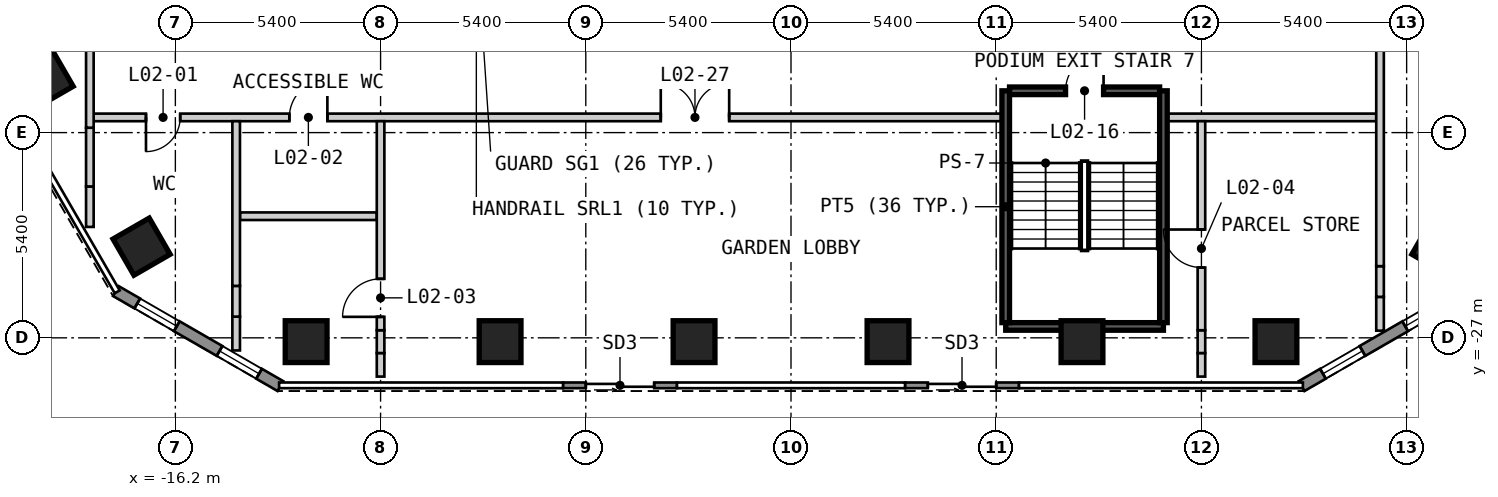
"""IFC4 building model, lengths in metres.
Left out: names, types, materials, properties, quantities, classifications, styles, units other than length and angle.
Written with IfcOpenShell. Run it as: python <this file> out.ifc"""

import sys

from ifc_helpers import new_model, si_unit, direction, frame, frame_2d, origin, origin_2d, place, context, subcontext, project, spatial, polyline, rectangle, outline, extrude, element, fill, save


model = new_model("IFC4")
c1 = context("Model", 3, precision=1e-05, world=origin(), true_north=direction((0.0, 1.0)))
c2 = subcontext(c1, "Body", "Model", "MODEL_VIEW")
j1 = project(units=[si_unit("LENGTHUNIT", "METRE"), si_unit("PLANEANGLEUNIT", "RADIAN")], contexts=[c1])
p1 = place(None, origin())
s1 = spatial("IfcSite", under=j1, at=p1, CompositionType="ELEMENT")
p2 = place(p1, origin())
s2 = spatial("IfcBuilding", under=s1, at=p2, CompositionType="ELEMENT")
p3 = place(p2, frame((0.0, 0.0, 9.0)))
s3 = spatial("IfcBuildingStorey", under=s2, at=p3, CompositionType="ELEMENT", Elevation=9.0)
for number, where, z_axis, x_axis in (
    (1, (-19.641, -20.181, 0.0), (0.0, 0.0, 1.0), (0.5, -0.866, 0.0)),
    (2, (-17.089, -24.601, 0.0), (0.0, 0.0, 1.0), (0.5, -0.866, 0.0)),
    (3, (-12.759, -27.1, 0.0), (0.0, 0.0, 1.0), (1.0, 0.0, 0.0)),
    (4, (-7.655, -27.1, 0.0), (0.0, 0.0, 1.0), (1.0, 0.0, 0.0)),
    (5, (-2.551, -27.1, 0.0), (0.0, 0.0, 1.0), (1.0, 0.0, 0.0)),
    (6, (2.553, -27.1, 0.0), (0.0, 0.0, 1.0), (1.0, 0.0, 0.0)),
    (7, (7.657, -27.1, 0.0), (0.0, 0.0, 1.0), (1.0, 0.0, 0.0)),
    (8, (12.761, -27.1, 0.0), (0.0, 0.0, 1.0), (1.0, 0.0, 0.0)),
    (9, (17.09, -24.6, 0.0), (0.0, 0.0, 1.0), (0.5, 0.866, 0.0)),
):
    element("IfcColumn", number, at=place(p3, frame(where, z_axis=z_axis, x_axis=x_axis)), inside=s3, PredefinedType="COLUMN", context=c2, shape_type="SweptSolid", body=[
        extrude(rectangle(XDim=1.1, YDim=1.1, at=origin_2d()), origin(), (0.0, 0.0, 1.0), 3.6),
    ])
p4 = place(p3, frame((-17.765, -25.77, 0.0), z_axis=(0.0, 0.0, 1.0), x_axis=(0.866010750942, -0.50002537861, 0.0)))
e10 = element("IfcWall", 10, at=p4, inside=s3, PredefinedType="SOLIDWALL", context=c2, shape_type="SweptSolid", body=[
    extrude(outline(polyline([(0.0, -0.15), (5.0, -0.15), (4.919, 0.15), (0.08, 0.15), (0.0, -0.15)])), origin(), (0.0, 0.0, 1.0), 3.25),
])
p5 = place(p4, frame((0.65, 0.0, 0.15)))
e11 = element("IfcOpeningElement", 11, at=p5, cuts=e10, PredefinedType="OPENING", context=c2, shape_type="SweptSolid", body=[
    extrude(rectangle(XDim=1.2, YDim=2.1, at=frame_2d((0.6, 1.05))), frame((0.0, 0.16, 0.0), z_axis=(0.0, -1.0, 0.0), x_axis=(1.0, 0.0, 0.0)), (0.0, 0.0, 1.0), 0.32),
])
p6 = place(p4, frame((3.15, 0.0, 0.15)))
e12 = element("IfcOpeningElement", 12, at=p6, cuts=e10, PredefinedType="OPENING", context=c2, shape_type="SweptSolid", body=[
    extrude(rectangle(XDim=1.2, YDim=2.1, at=frame_2d((0.6, 1.05))), frame((0.0, 0.16, 0.0), z_axis=(0.0, -1.0, 0.0), x_axis=(1.0, 0.0, 0.0)), (0.0, 0.0, 1.0), 0.32),
])
p7 = place(p3, frame((-6.0, -28.25, 0.0), z_axis=(0.0, 0.0, 1.0), x_axis=(1.0, 0.0, 0.0)))
e13 = element("IfcWall", 13, at=p7, inside=s3, PredefinedType="SOLIDWALL", context=c2, shape_type="SweptSolid", body=[
    extrude(rectangle(XDim=3.0, YDim=0.15, at=frame_2d((1.5, 0.0))), origin(), (0.0, 0.0, 1.0), 3.25),
])
p8 = place(p7, frame((0.6, 0.0, 0.0)))
e14 = element("IfcOpeningElement", 14, at=p8, cuts=e13, PredefinedType="OPENING", context=c2, shape_type="SweptSolid", body=[
    extrude(rectangle(XDim=1.8, YDim=2.4, at=frame_2d((0.9, 1.2))), frame((0.0, 0.085, 0.0), z_axis=(0.0, -1.0, 0.0), x_axis=(1.0, 0.0, 0.0)), (0.0, 0.0, 1.0), 0.17),
])
p9 = place(p3, frame((3.0, -28.25, 0.0), z_axis=(0.0, 0.0, 1.0), x_axis=(1.0, 0.0, 0.0)))
e15 = element("IfcWall", 15, at=p9, inside=s3, PredefinedType="SOLIDWALL", context=c2, shape_type="SweptSolid", body=[
    extrude(rectangle(XDim=3.0, YDim=0.15, at=frame_2d((1.5, 0.0))), origin(), (0.0, 0.0, 1.0), 3.25),
])
p10 = place(p9, frame((0.6, 0.0, 0.0)))
e16 = element("IfcOpeningElement", 16, at=p10, cuts=e15, PredefinedType="OPENING", context=c2, shape_type="SweptSolid", body=[
    extrude(rectangle(XDim=1.8, YDim=2.4, at=frame_2d((0.9, 1.2))), frame((0.0, 0.085, 0.0), z_axis=(0.0, -1.0, 0.0), x_axis=(1.0, 0.0, 0.0)), (0.0, 0.0, 1.0), 0.17),
])
p11 = place(p3, frame((13.435, -28.27, 0.0), z_axis=(0.0, 0.0, 1.0), x_axis=(0.866010750942, 0.50002537861, 0.0)))
e17 = element("IfcWall", 17, at=p11, inside=s3, PredefinedType="SOLIDWALL", context=c2, shape_type="SweptSolid", body=[
    extrude(outline(polyline([(0.0, -0.15), (5.0, -0.15), (4.919, 0.15), (0.08, 0.15), (0.0, -0.15)])), origin(), (0.0, 0.0, 1.0), 3.25),
])
p12 = place(p11, frame((0.65, 0.0, 0.15)))
e18 = element("IfcOpeningElement", 18, at=p12, cuts=e17, PredefinedType="OPENING", context=c2, shape_type="SweptSolid", body=[
    extrude(rectangle(XDim=1.2, YDim=2.1, at=frame_2d((0.6, 1.05))), frame((0.0, 0.16, 0.0), z_axis=(0.0, -1.0, 0.0), x_axis=(1.0, 0.0, 0.0)), (0.0, 0.0, 1.0), 0.32),
])
p13 = place(p11, frame((3.149, 0.0, 0.15)))
e19 = element("IfcOpeningElement", 19, at=p13, cuts=e17, PredefinedType="OPENING", context=c2, shape_type="SweptSolid", body=[
    extrude(rectangle(XDim=1.2, YDim=2.1, at=frame_2d((0.6, 1.05))), frame((0.0, 0.16, 0.0), z_axis=(0.0, -1.0, 0.0), x_axis=(1.0, 0.0, 0.0)), (0.0, 0.0, 1.0), 0.32),
])
p14 = place(p3, frame((5.65, -26.7, 0.0), z_axis=(0.0, 0.0, 1.0), x_axis=(1.0, 0.0, 0.0)))
e20 = element("IfcWall", 20, at=p14, inside=s3, PredefinedType="SOLIDWALL", context=c2, shape_type="SweptSolid", body=[
    extrude(rectangle(XDim=4.15, YDim=0.2, at=frame_2d((2.075, 0.0))), origin(), (0.0, 0.0, 1.0), 3.25),
])
p15 = place(p3, frame((-14.5, -23.8, 0.0), z_axis=(0.0, 0.0, 1.0), x_axis=(1.0, 0.0, 0.0)))
e21 = element("IfcWall", 21, at=p15, inside=s3, PredefinedType="PARTITIONING", context=c2, shape_type="SweptSolid", body=[
    extrude(rectangle(XDim=3.6, YDim=0.2, at=frame_2d((1.8, 0.0))), origin(), (0.0, 0.0, 1.0), 3.25),
])
p16 = place(p3, frame((-18.35, -21.2, 0.0), z_axis=(0.0, 0.0, 1.0), x_axis=(1.0, 0.0, 0.0)))
e22 = element("IfcWall", 22, at=p16, inside=s3, PredefinedType="PARTITIONING", context=c2, shape_type="SweptSolid", body=[
    extrude(rectangle(XDim=24.1, YDim=0.2, at=frame_2d((12.05, 0.0))), origin(), (0.0, 0.0, 1.0), 3.25),
])
p17 = place(p16, frame((2.277, 0.0, 0.0), z_axis=(0.0, 0.0, 1.0), x_axis=(-1.0, 0.0, 0.0)))
e23 = element("IfcOpeningElement", 23, at=p17, cuts=e22, PredefinedType="OPENING", context=c2, shape_type="SweptSolid", body=[
    extrude(rectangle(XDim=0.9, YDim=2.1, at=frame_2d((0.45, 1.05))), frame((0.0, 0.11, 0.0), z_axis=(0.0, -1.0, 0.0), x_axis=(1.0, 0.0, 0.0)), (0.0, 0.0, 1.0), 0.22),
])
p18 = place(p16, frame((6.15, 0.0, 0.0), z_axis=(0.0, 0.0, 1.0), x_axis=(-1.0, 0.0, 0.0)))
e24 = element("IfcOpeningElement", 24, at=p18, cuts=e22, PredefinedType="OPENING", context=c2, shape_type="SweptSolid", body=[
    extrude(rectangle(XDim=1.0, YDim=2.1, at=frame_2d((0.5, 1.05))), frame((0.0, 0.11, 0.0), z_axis=(0.0, -1.0, 0.0), x_axis=(1.0, 0.0, 0.0)), (0.0, 0.0, 1.0), 0.22),
])
p19 = place(p16, frame((14.923, 0.0, 0.0)))
e25 = element("IfcOpeningElement", 25, at=p19, cuts=e22, PredefinedType="OPENING", context=c2, shape_type="SweptSolid", body=[
    extrude(rectangle(XDim=1.8, YDim=2.1, at=frame_2d((0.9, 1.05))), frame((0.0, 0.11, 0.0), z_axis=(0.0, -1.0, 0.0), x_axis=(1.0, 0.0, 0.0)), (0.0, 0.0, 1.0), 0.22),
])
p20 = place(p3, frame((9.7, -21.2, 0.0), z_axis=(0.0, 0.0, 1.0), x_axis=(1.0, 0.0, 0.0)))
e26 = element("IfcWall", 26, at=p20, inside=s3, PredefinedType="PARTITIONING", context=c2, shape_type="SweptSolid", body=[
    extrude(rectangle(XDim=5.7, YDim=0.2, at=frame_2d((2.85, 0.0))), origin(), (0.0, 0.0, 1.0), 3.25),
])
p21 = place(p3, frame((5.75, -20.5, 0.0), z_axis=(0.0, 0.0, 1.0), x_axis=(1.0, 0.0, 0.0)))
e27 = element("IfcWall", 27, at=p21, inside=s3, PredefinedType="SOLIDWALL", context=c2, shape_type="SweptSolid", body=[
    extrude(rectangle(XDim=3.95, YDim=0.2, at=frame_2d((1.975, 0.0))), origin(), (0.0, 0.0, 1.0), 3.25),
])
p22 = place(p21, frame((2.475, 0.0, 0.0), z_axis=(0.0, 0.0, 1.0), x_axis=(-1.0, 0.0, 0.0)))
e28 = element("IfcOpeningElement", 28, at=p22, cuts=e27, PredefinedType="OPENING", context=c2, shape_type="SweptSolid", body=[
    extrude(rectangle(XDim=1.0, YDim=2.1, at=frame_2d((0.5, 1.05))), frame((0.0, 0.11, 0.0), z_axis=(0.0, -1.0, 0.0), x_axis=(1.0, 0.0, 0.0)), (0.0, 0.0, 1.0), 0.22),
])
p23 = place(p3, frame((-18.45, -24.082, 0.0), z_axis=(0.0, 0.0, 1.0), x_axis=(0.0, 1.0, 0.0)))
e29 = element("IfcWall", 29, at=p23, inside=s3, PredefinedType="PARTITIONING", context=c2, shape_type="SweptSolid", body=[
    extrude(rectangle(XDim=1.065, YDim=0.2, at=frame_2d((0.532, 0.0))), origin(), (0.0, 0.0, 1.0), 3.25),
])
p24 = place(p3, frame((-18.45, -23.017, 0.0), z_axis=(0.0, 0.0, 1.0), x_axis=(0.0, 1.0, 0.0)))
e30 = element("IfcWall", 30, at=p24, inside=s3, PredefinedType="PARTITIONING", context=c2, shape_type="SweptSolid", body=[
    extrude(rectangle(XDim=1.546, YDim=0.2, at=frame_2d((0.773, 0.0))), origin(), (0.0, 0.0, 1.0), 2.52),
])
p25 = place(p3, frame((-18.45, -21.471, 0.0), z_axis=(0.0, 0.0, 1.0), x_axis=(0.0, 1.0, 0.0)))
e31 = element("IfcWall", 31, at=p25, inside=s3, PredefinedType="PARTITIONING", context=c2, shape_type="SweptSolid", body=[
    extrude(rectangle(XDim=23.371, YDim=0.2, at=frame_2d((11.686, 0.0))), origin(), (0.0, 0.0, 1.0), 3.25),
])
p26 = place(p25, frame((5.873, 0.0, 0.0)))
e32 = element("IfcOpeningElement", 32, at=p26, cuts=e31, PredefinedType="OPENING", context=c2, shape_type="SweptSolid", body=[
    extrude(rectangle(XDim=1.0, YDim=2.1, at=frame_2d((0.5, 1.05))), frame((0.0, 0.11, 0.0), z_axis=(0.0, -1.0, 0.0), x_axis=(1.0, 0.0, 0.0)), (0.0, 0.0, 1.0), 0.22),
])
p27 = place(p25, frame((17.469, 0.0, 0.0)))
e33 = element("IfcOpeningElement", 33, at=p27, cuts=e31, PredefinedType="OPENING", context=c2, shape_type="SweptSolid", body=[
    extrude(rectangle(XDim=1.0, YDim=2.1, at=frame_2d((0.5, 1.05))), frame((0.0, 0.11, 0.0), z_axis=(0.0, -1.0, 0.0), x_axis=(1.0, 0.0, 0.0)), (0.0, 0.0, 1.0), 0.22),
])
p28 = place(p3, frame((-14.6, -27.332, 0.0), z_axis=(0.0, 0.0, 1.0), x_axis=(0.0, 1.0, 0.0)))
e34 = element("IfcWall", 34, at=p28, inside=s3, PredefinedType="PARTITIONING", context=c2, shape_type="SweptSolid", body=[
    extrude(rectangle(XDim=0.89, YDim=0.2, at=frame_2d((0.445, 0.0))), origin(), (0.0, 0.0, 1.0), 3.25),
])
p29 = place(p3, frame((-14.6, -26.442, 0.0), z_axis=(0.0, 0.0, 1.0), x_axis=(0.0, 1.0, 0.0)))
e35 = element("IfcWall", 35, at=p29, inside=s3, PredefinedType="PARTITIONING", context=c2, shape_type="SweptSolid", body=[
    extrude(rectangle(XDim=0.809, YDim=0.2, at=frame_2d((0.404, 0.0))), origin(), (0.0, 0.0, 1.0), 2.52),
])
p30 = place(p3, frame((-14.6, -25.633, 0.0), z_axis=(0.0, 0.0, 1.0), x_axis=(0.0, 1.0, 0.0)))
e36 = element("IfcWall", 36, at=p30, inside=s3, PredefinedType="PARTITIONING", context=c2, shape_type="SweptSolid", body=[
    extrude(rectangle(XDim=4.333, YDim=0.2, at=frame_2d((2.167, 0.0))), origin(), (0.0, 0.0, 1.0), 3.25),
])
p31 = place(p3, frame((-10.8, -28.02, 0.0), z_axis=(0.0, 0.0, 1.0), x_axis=(0.0, 1.0, 0.0)))
e37 = element("IfcWall", 37, at=p31, inside=s3, PredefinedType="PARTITIONING", context=c2, shape_type="SweptSolid", body=[
    extrude(rectangle(XDim=0.62, YDim=0.2, at=frame_2d((0.31, 0.0))), origin(), (0.0, 0.0, 1.0), 3.25),
])
p32 = place(p3, frame((-10.8, -27.4, 0.0), z_axis=(0.0, 0.0, 1.0), x_axis=(0.0, 1.0, 0.0)))
e38 = element("IfcWall", 38, at=p32, inside=s3, PredefinedType="PARTITIONING", context=c2, shape_type="SweptSolid", body=[
    extrude(rectangle(XDim=0.6, YDim=0.2, at=frame_2d((0.3, 0.0))), origin(), (0.0, 0.0, 1.0), 2.52),
])
p33 = place(p3, frame((-10.8, -26.8, 0.0), z_axis=(0.0, 0.0, 1.0), x_axis=(0.0, 1.0, 0.0)))
e39 = element("IfcWall", 39, at=p33, inside=s3, PredefinedType="PARTITIONING", context=c2, shape_type="SweptSolid", body=[
    extrude(rectangle(XDim=5.5, YDim=0.2, at=frame_2d((2.75, 0.0))), origin(), (0.0, 0.0, 1.0), 3.25),
])
p34 = place(p33, frame((0.352, 0.0, 0.0)))
e40 = element("IfcOpeningElement", 40, at=p34, cuts=e39, PredefinedType="OPENING", context=c2, shape_type="SweptSolid", body=[
    extrude(rectangle(XDim=1.0, YDim=2.1, at=frame_2d((0.5, 1.05))), frame((0.0, 0.11, 0.0), z_axis=(0.0, -1.0, 0.0), x_axis=(1.0, 0.0, 0.0)), (0.0, 0.0, 1.0), 0.22),
])
for number, where, z_axis, x_axis in (
    (41, (5.65, -26.6, 0.0), (0.0, 0.0, 1.0), (0.0, 1.0, 0.0)),
    (42, (9.8, -26.6, 0.0), (0.0, 0.0, 1.0), (0.0, 1.0, 0.0)),
):
    element("IfcWall", number, at=place(p3, frame(where, z_axis=z_axis, x_axis=x_axis)), inside=s3, PredefinedType="SOLIDWALL", context=c2, shape_type="SweptSolid", body=[
        extrude(rectangle(XDim=6.1, YDim=0.2, at=frame_2d((3.05, 0.0))), origin(), (0.0, 0.0, 1.0), 3.25),
    ])
p35 = place(p3, frame((10.8, -28.02, 0.0), z_axis=(0.0, 0.0, 1.0), x_axis=(0.0, 1.0, 0.0)))
e43 = element("IfcWall", 43, at=p35, inside=s3, PredefinedType="PARTITIONING", context=c2, shape_type="SweptSolid", body=[
    extrude(rectangle(XDim=0.62, YDim=0.2, at=frame_2d((0.31, 0.0))), origin(), (0.0, 0.0, 1.0), 3.25),
])
p36 = place(p3, frame((10.8, -27.4, 0.0), z_axis=(0.0, 0.0, 1.0), x_axis=(0.0, 1.0, 0.0)))
e44 = element("IfcWall", 44, at=p36, inside=s3, PredefinedType="PARTITIONING", context=c2, shape_type="SweptSolid", body=[
    extrude(rectangle(XDim=0.6, YDim=0.2, at=frame_2d((0.3, 0.0))), origin(), (0.0, 0.0, 1.0), 2.52),
])
p37 = place(p3, frame((10.8, -26.8, 0.0), z_axis=(0.0, 0.0, 1.0), x_axis=(0.0, 1.0, 0.0)))
e45 = element("IfcWall", 45, at=p37, inside=s3, PredefinedType="PARTITIONING", context=c2, shape_type="SweptSolid", body=[
    extrude(rectangle(XDim=5.5, YDim=0.2, at=frame_2d((2.75, 0.0))), origin(), (0.0, 0.0, 1.0), 3.25),
])
p38 = place(p37, frame((2.65, 0.0, 0.0), z_axis=(0.0, 0.0, 1.0), x_axis=(-1.0, 0.0, 0.0)))
e46 = element("IfcOpeningElement", 46, at=p38, cuts=e45, PredefinedType="OPENING", context=c2, shape_type="SweptSolid", body=[
    extrude(rectangle(XDim=1.0, YDim=2.1, at=frame_2d((0.5, 1.05))), frame((0.0, 0.11, 0.0), z_axis=(0.0, -1.0, 0.0), x_axis=(1.0, 0.0, 0.0)), (0.0, 0.0, 1.0), 0.22),
])
p39 = place(p3, frame((15.5, -26.812, 0.0), z_axis=(0.0, 0.0, 1.0), x_axis=(0.0, 1.0, 0.0)))
e47 = element("IfcWall", 47, at=p39, inside=s3, PredefinedType="PARTITIONING", context=c2, shape_type="SweptSolid", body=[
    extrude(rectangle(XDim=0.89, YDim=0.2, at=frame_2d((0.445, 0.0))), origin(), (0.0, 0.0, 1.0), 3.25),
])
p40 = place(p3, frame((15.5, -25.922, 0.0), z_axis=(0.0, 0.0, 1.0), x_axis=(0.0, 1.0, 0.0)))
e48 = element("IfcWall", 48, at=p40, inside=s3, PredefinedType="PARTITIONING", context=c2, shape_type="SweptSolid", body=[
    extrude(rectangle(XDim=0.808, YDim=0.2, at=frame_2d((0.404, 0.0))), origin(), (0.0, 0.0, 1.0), 2.52),
])
p41 = place(p3, frame((15.5, -25.114, 0.0), z_axis=(0.0, 0.0, 1.0), x_axis=(0.0, 1.0, 0.0)))
e49 = element("IfcWall", 49, at=p41, inside=s3, PredefinedType="PARTITIONING", context=c2, shape_type="SweptSolid", body=[
    extrude(rectangle(XDim=27.014, YDim=0.2, at=frame_2d((13.507, 0.0))), origin(), (0.0, 0.0, 1.0), 3.25),
])
p42 = place(p41, frame((10.516, 0.0, 0.0), z_axis=(0.0, 0.0, 1.0), x_axis=(-1.0, 0.0, 0.0)))
e50 = element("IfcOpeningElement", 50, at=p42, cuts=e49, PredefinedType="OPENING", context=c2, shape_type="SweptSolid", body=[
    extrude(rectangle(XDim=1.0, YDim=2.1, at=frame_2d((0.5, 1.05))), frame((0.0, 0.11, 0.0), z_axis=(0.0, -1.0, 0.0), x_axis=(1.0, 0.0, 0.0)), (0.0, 0.0, 1.0), 0.22),
])
p43 = place(p41, frame((22.112, 0.0, 0.0), z_axis=(0.0, 0.0, 1.0), x_axis=(-1.0, 0.0, 0.0)))
e51 = element("IfcOpeningElement", 51, at=p43, cuts=e49, PredefinedType="OPENING", context=c2, shape_type="SweptSolid", body=[
    extrude(rectangle(XDim=1.0, YDim=2.1, at=frame_2d((0.5, 1.05))), frame((0.0, 0.11, 0.0), z_axis=(0.0, -1.0, 0.0), x_axis=(1.0, 0.0, 0.0)), (0.0, 0.0, 1.0), 0.22),
])
p44 = place(p5, origin())
e52 = element("IfcWindow", 52, at=p44, inside=s3, PartitioningType="SINGLE_PANEL", PredefinedType="WINDOW", context=c2, shape_type="SweptSolid", body=[
    extrude(rectangle(XDim=1.2, YDim=2.1, at=frame_2d((0.6, 1.05))), frame((0.0, 0.03, 0.0), z_axis=(0.0, -1.0, 0.0), x_axis=(1.0, 0.0, 0.0)), (0.0, 0.0, 1.0), 0.06),
])
fill(e11, e52)
p45 = place(p6, origin())
e53 = element("IfcWindow", 53, at=p45, inside=s3, PartitioningType="SINGLE_PANEL", PredefinedType="WINDOW", context=c2, shape_type="SweptSolid", body=[
    extrude(rectangle(XDim=1.2, YDim=2.1, at=frame_2d((0.6, 1.05))), frame((0.0, 0.03, 0.0), z_axis=(0.0, -1.0, 0.0), x_axis=(1.0, 0.0, 0.0)), (0.0, 0.0, 1.0), 0.06),
])
fill(e12, e53)
p46 = place(p8, origin())
e54 = element("IfcDoor", 54, at=p46, inside=s3, OperationType="SLIDING_TO_LEFT", PredefinedType="DOOR", context=c2, shape_type="SweptSolid", body=[
    extrude(rectangle(XDim=1.8, YDim=2.4, at=frame_2d((0.9, 1.2))), frame((0.0, 0.025, 0.0), z_axis=(0.0, -1.0, 0.0), x_axis=(1.0, 0.0, 0.0)), (0.0, 0.0, 1.0), 0.05),
])
fill(e14, e54)
p47 = place(p10, origin())
e55 = element("IfcDoor", 55, at=p47, inside=s3, OperationType="SLIDING_TO_LEFT", PredefinedType="DOOR", context=c2, shape_type="SweptSolid", body=[
    extrude(rectangle(XDim=1.8, YDim=2.4, at=frame_2d((0.9, 1.2))), frame((0.0, 0.025, 0.0), z_axis=(0.0, -1.0, 0.0), x_axis=(1.0, 0.0, 0.0)), (0.0, 0.0, 1.0), 0.05),
])
fill(e16, e55)
p48 = place(p12, origin())
e56 = element("IfcWindow", 56, at=p48, inside=s3, PartitioningType="SINGLE_PANEL", PredefinedType="WINDOW", context=c2, shape_type="SweptSolid", body=[
    extrude(rectangle(XDim=1.2, YDim=2.1, at=frame_2d((0.6, 1.05))), frame((0.0, 0.03, 0.0), z_axis=(0.0, -1.0, 0.0), x_axis=(1.0, 0.0, 0.0)), (0.0, 0.0, 1.0), 0.06),
])
fill(e18, e56)
p49 = place(p13, origin())
e57 = element("IfcWindow", 57, at=p49, inside=s3, PartitioningType="SINGLE_PANEL", PredefinedType="WINDOW", context=c2, shape_type="SweptSolid", body=[
    extrude(rectangle(XDim=1.2, YDim=2.1, at=frame_2d((0.6, 1.05))), frame((0.0, 0.03, 0.0), z_axis=(0.0, -1.0, 0.0), x_axis=(1.0, 0.0, 0.0)), (0.0, 0.0, 1.0), 0.06),
])
fill(e19, e57)
p50 = place(p17, origin())
e58 = element("IfcDoor", 58, at=p50, inside=s3, OperationType="SINGLE_SWING_RIGHT", PredefinedType="DOOR", context=c2, shape_type="SweptSolid", body=[
    extrude(rectangle(XDim=0.9, YDim=2.1, at=frame_2d((0.45, 1.05))), frame((0.0, 0.025, 0.0), z_axis=(0.0, -1.0, 0.0), x_axis=(1.0, 0.0, 0.0)), (0.0, 0.0, 1.0), 0.05),
])
fill(e23, e58)
p51 = place(p18, origin())
e59 = element("IfcDoor", 59, at=p51, inside=s3, OperationType="SINGLE_SWING_LEFT", PredefinedType="DOOR", context=c2, shape_type="SweptSolid", body=[
    extrude(rectangle(XDim=1.0, YDim=2.1, at=frame_2d((0.5, 1.05))), frame((0.0, 0.025, 0.0), z_axis=(0.0, -1.0, 0.0), x_axis=(1.0, 0.0, 0.0)), (0.0, 0.0, 1.0), 0.05),
])
fill(e24, e59)
p52 = place(p34, origin())
e60 = element("IfcDoor", 60, at=p52, inside=s3, OperationType="SINGLE_SWING_LEFT", PredefinedType="DOOR", context=c2, shape_type="SweptSolid", body=[
    extrude(rectangle(XDim=1.0, YDim=2.1, at=frame_2d((0.5, 1.05))), frame((0.0, 0.025, 0.0), z_axis=(0.0, -1.0, 0.0), x_axis=(1.0, 0.0, 0.0)), (0.0, 0.0, 1.0), 0.05),
])
fill(e40, e60)
p53 = place(p38, origin())
e61 = element("IfcDoor", 61, at=p53, inside=s3, OperationType="SINGLE_SWING_LEFT", PredefinedType="DOOR", context=c2, shape_type="SweptSolid", body=[
    extrude(rectangle(XDim=1.0, YDim=2.1, at=frame_2d((0.5, 1.05))), frame((0.0, 0.025, 0.0), z_axis=(0.0, -1.0, 0.0), x_axis=(1.0, 0.0, 0.0)), (0.0, 0.0, 1.0), 0.05),
])
fill(e46, e61)
p54 = place(p22, origin())
e62 = element("IfcDoor", 62, at=p54, inside=s3, OperationType="SINGLE_SWING_LEFT", PredefinedType="DOOR", context=c2, shape_type="SweptSolid", body=[
    extrude(rectangle(XDim=1.0, YDim=2.1, at=frame_2d((0.5, 1.05))), frame((0.0, 0.025, 0.0), z_axis=(0.0, -1.0, 0.0), x_axis=(1.0, 0.0, 0.0)), (0.0, 0.0, 1.0), 0.05),
])
fill(e28, e62)
p55 = place(p19, origin())
e63 = element("IfcDoor", 63, at=p55, inside=s3, OperationType="DOUBLE_DOOR_SINGLE_SWING", PredefinedType="DOOR", context=c2, shape_type="SweptSolid", body=[
    extrude(rectangle(XDim=1.8, YDim=2.1, at=frame_2d((0.9, 1.05))), frame((0.0, 0.025, 0.0), z_axis=(0.0, -1.0, 0.0), x_axis=(1.0, 0.0, 0.0)), (0.0, 0.0, 1.0), 0.05),
])
fill(e25, e63)
save(model, sys.argv[1])
